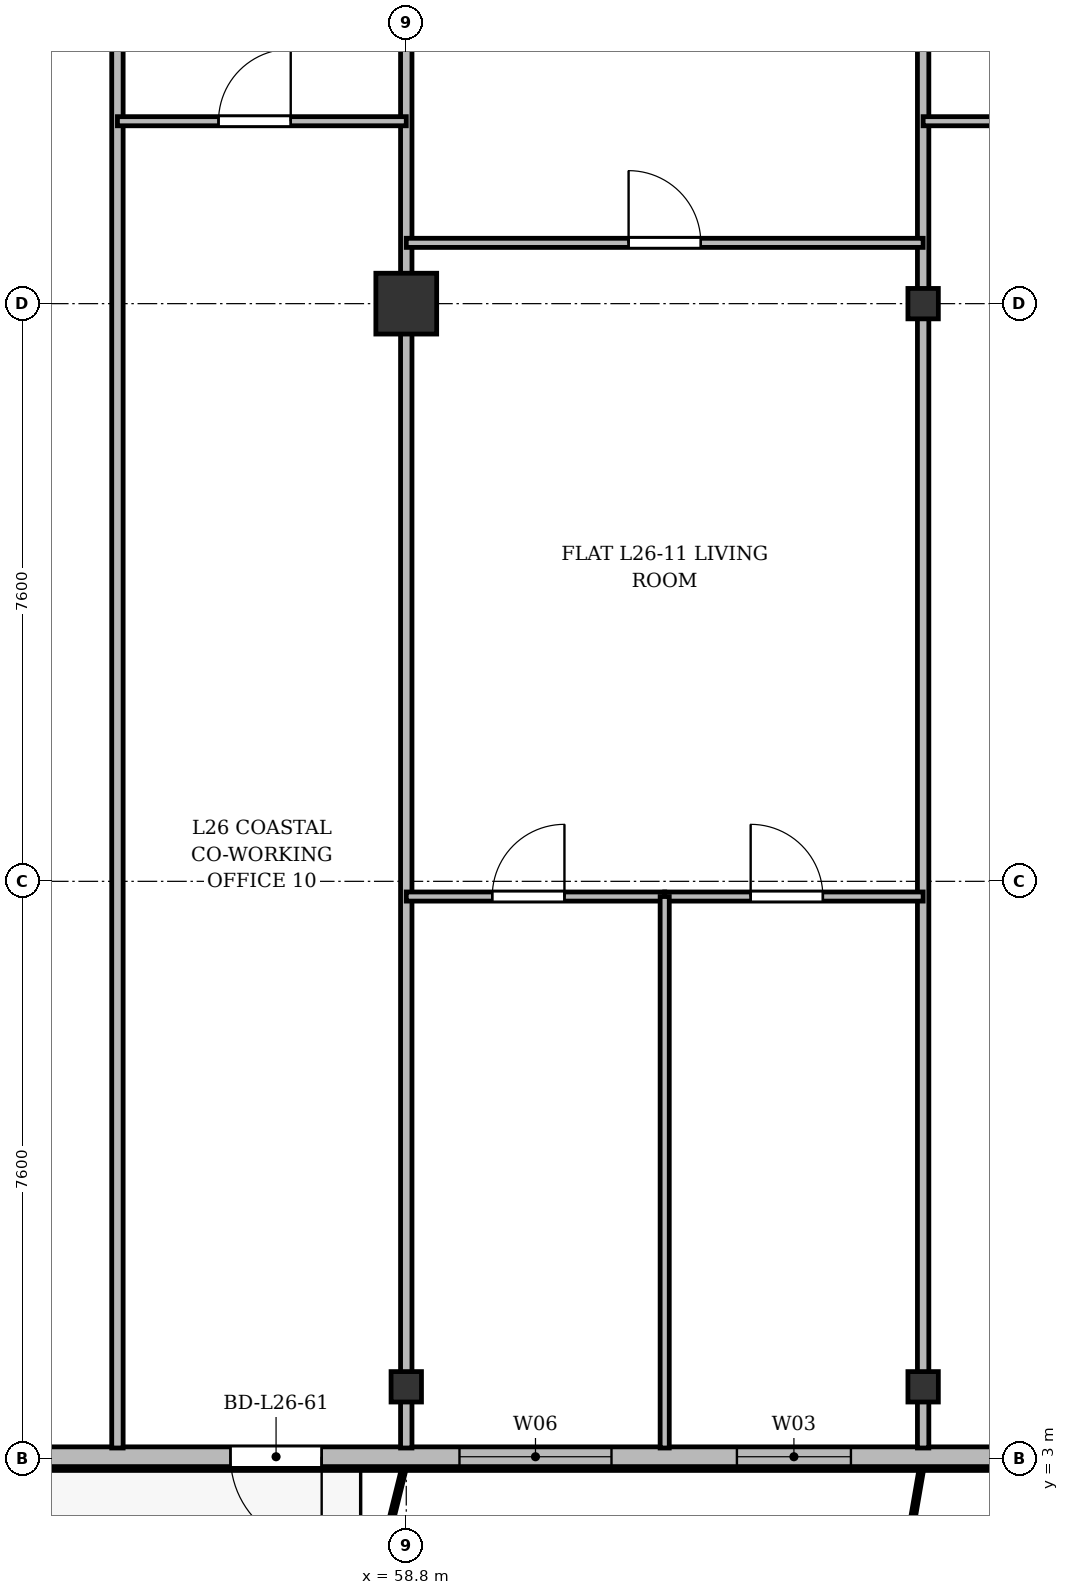
"""IFC4 building model, lengths in metres.
Left out: names, types, materials, properties, quantities, classifications, styles, units other than length and angle.
Written with IfcOpenShell. Run it as: python <this file> out.ifc"""

import sys

from ifc_helpers import new_model, si_unit, direction, frame, frame_2d, origin, origin_2d, place, context, subcontext, project, spatial, rectangle, i_section, extrude, source, transform, mapped, element, fill, save


model = new_model("IFC4")
c1 = context("Model", 3, precision=1e-05, world=origin(), true_north=direction((0.0, 1.0)))
c2 = subcontext(c1, "Body", "Model", "MODEL_VIEW")
j1 = project(units=[si_unit("LENGTHUNIT", "METRE"), si_unit("PLANEANGLEUNIT", "RADIAN")], contexts=[c1])
p1 = place(None, origin())
s1 = spatial("IfcSite", under=j1, at=p1, CompositionType="ELEMENT")
p2 = place(p1, origin())
s2 = spatial("IfcBuilding", under=s1, at=p2, CompositionType="ELEMENT")
p3 = place(p2, frame((0.0, 0.0, 103.3)))
s3 = spatial("IfcBuildingStorey", under=s2, at=p3, CompositionType="ELEMENT", Elevation=103.3)
m1 = source(origin(), c2, "Body", "SweptSolid", [
    extrude(i_section(OverallWidth=0.4, OverallDepth=0.4, WebThickness=0.022, FlangeThickness=0.035, at=origin_2d()), origin(), (0.0, 0.0, 1.0), 3.6),
])
p4 = place(p3, frame((58.8, 3.95, 0.0), z_axis=(0.0, 0.0, 1.0), x_axis=(1.0, 0.0, 0.0)))
e1 = element("IfcColumn", 1, at=p4, inside=s3, PredefinedType="COLUMN", context=c2, shape_type="MappedRepresentation", body=[
    mapped(m1, transform((0.0, 0.0, 0.0), x_axis=(1.0, 0.0, 0.0), y_axis=(0.0, 1.0, 0.0), z_axis=(0.0, 0.0, 1.0), scale=1.0)),
])
m2 = source(origin(), c2, "Body", "SweptSolid", [
    extrude(rectangle(XDim=0.8, YDim=0.8, at=origin_2d()), origin(), (0.0, 0.0, 1.0), 3.6),
])
p5 = place(p3, frame((58.8, 18.2, 0.0), z_axis=(0.0, 0.0, 1.0), x_axis=(1.0, 0.0, 0.0)))
e2 = element("IfcColumn", 2, at=p5, inside=s3, PredefinedType="COLUMN", context=c2, shape_type="MappedRepresentation", body=[
    mapped(m2, transform((0.0, 0.0, 0.0), x_axis=(1.0, 0.0, 0.0), y_axis=(0.0, 1.0, 0.0), z_axis=(0.0, 0.0, 1.0), scale=1.0)),
])
for number, where, z_axis, x_axis in (
    (3, (65.6, 3.95, 0.0), (0.0, 0.0, 1.0), (1.0, 0.0, 0.0)),
    (4, (65.6, 18.2, 0.0), (0.0, 0.0, 1.0), (1.0, 0.0, 0.0)),
):
    element("IfcColumn", number, at=place(p3, frame(where, z_axis=z_axis, x_axis=x_axis)), inside=s3, PredefinedType="COLUMN", context=c2, shape_type="MappedRepresentation", body=[
        mapped(m1, transform((0.0, 0.0, 0.0), x_axis=(1.0, 0.0, 0.0), y_axis=(0.0, 1.0, 0.0), z_axis=(0.0, 0.0, 1.0), scale=1.0)),
    ])
p6 = place(p3, frame((66.9, 3.03, 0.0), z_axis=(0.0, 0.0, 1.0), x_axis=(-1.0, 0.0, 0.0)))
e5 = element("IfcWall", 5, at=p6, inside=s3, PredefinedType="SOLIDWALL", context=c2, shape_type="SweptSolid", body=[
    extrude(rectangle(XDim=59.4, YDim=0.26, at=frame_2d((29.7, 0.0))), origin(), (0.0, 0.0, 1.0), 3.34),
])
p7 = place(p6, frame((2.25, 0.0, 0.9)))
e6 = element("IfcOpeningElement", 6, at=p7, cuts=e5, PredefinedType="OPENING", context=c2, shape_type="SweptSolid", body=[
    extrude(rectangle(XDim=1.5, YDim=1.75, at=frame_2d((0.75, 0.875))), frame((0.0, 0.14, 0.0), z_axis=(0.0, -1.0, 0.0), x_axis=(1.0, 0.0, 0.0)), (0.0, 0.0, 1.0), 0.28),
])
p8 = place(p6, frame((5.4, 0.0, 0.9)))
e7 = element("IfcOpeningElement", 7, at=p8, cuts=e5, PredefinedType="OPENING", context=c2, shape_type="SweptSolid", body=[
    extrude(rectangle(XDim=2.0, YDim=1.95, at=frame_2d((1.0, 0.975))), frame((0.0, 0.14, 0.0), z_axis=(0.0, -1.0, 0.0), x_axis=(1.0, 0.0, 0.0)), (0.0, 0.0, 1.0), 0.28),
])
p9 = place(p6, frame((9.213, 0.0, 0.0)))
e8 = element("IfcOpeningElement", 8, at=p9, cuts=e5, PredefinedType="OPENING", context=c2, shape_type="SweptSolid", body=[
    extrude(rectangle(XDim=1.2, YDim=2.2, at=frame_2d((0.6, 1.1))), frame((0.0, 0.14, 0.0), z_axis=(0.0, -1.0, 0.0), x_axis=(1.0, 0.0, 0.0)), (0.0, 0.0, 1.0), 0.28),
])
p10 = place(p6, frame((13.0, 0.0, 0.9)))
e9 = element("IfcOpeningElement", 9, at=p10, cuts=e5, PredefinedType="OPENING", context=c2, shape_type="SweptSolid", body=[
    extrude(rectangle(XDim=1.8, YDim=1.8, at=frame_2d((0.9, 0.9))), frame((0.0, 0.14, 0.0), z_axis=(0.0, -1.0, 0.0), x_axis=(1.0, 0.0, 0.0)), (0.0, 0.0, 1.0), 0.28),
])
p11 = place(p6, frame((16.6, 0.0, 0.9)))
e10 = element("IfcOpeningElement", 10, at=p11, cuts=e5, PredefinedType="OPENING", context=c2, shape_type="SweptSolid", body=[
    extrude(rectangle(XDim=2.2, YDim=1.8, at=frame_2d((1.1, 0.9))), frame((0.0, 0.14, 0.0), z_axis=(0.0, -1.0, 0.0), x_axis=(1.0, 0.0, 0.0)), (0.0, 0.0, 1.0), 0.28),
])
p12 = place(p6, frame((20.55, 0.0, 0.9)))
e11 = element("IfcOpeningElement", 11, at=p12, cuts=e5, PredefinedType="OPENING", context=c2, shape_type="SweptSolid", body=[
    extrude(rectangle(XDim=1.5, YDim=1.75, at=frame_2d((0.75, 0.875))), frame((0.0, 0.14, 0.0), z_axis=(0.0, -1.0, 0.0), x_axis=(1.0, 0.0, 0.0)), (0.0, 0.0, 1.0), 0.28),
])
p13 = place(p6, frame((25.4, 0.0, 0.9)))
e12 = element("IfcOpeningElement", 12, at=p13, cuts=e5, PredefinedType="OPENING", context=c2, shape_type="SweptSolid", body=[
    extrude(rectangle(XDim=2.0, YDim=1.95, at=frame_2d((1.0, 0.975))), frame((0.0, 0.14, 0.0), z_axis=(0.0, -1.0, 0.0), x_axis=(1.0, 0.0, 0.0)), (0.0, 0.0, 1.0), 0.28),
])
p14 = place(p6, frame((32.175, 0.0, 0.9)))
e13 = element("IfcOpeningElement", 13, at=p14, cuts=e5, PredefinedType="OPENING", context=c2, shape_type="SweptSolid", body=[
    extrude(rectangle(XDim=1.65, YDim=1.85, at=frame_2d((0.825, 0.925))), frame((0.0, 0.14, 0.0), z_axis=(0.0, -1.0, 0.0), x_axis=(1.0, 0.0, 0.0)), (0.0, 0.0, 1.0), 0.28),
])
p15 = place(p6, frame((37.584, 0.0, 0.0)))
e14 = element("IfcOpeningElement", 14, at=p15, cuts=e5, PredefinedType="OPENING", context=c2, shape_type="SweptSolid", body=[
    extrude(rectangle(XDim=1.2, YDim=2.2, at=frame_2d((0.6, 1.1))), frame((0.0, 0.14, 0.0), z_axis=(0.0, -1.0, 0.0), x_axis=(1.0, 0.0, 0.0)), (0.0, 0.0, 1.0), 0.28),
])
p16 = place(p6, frame((40.5, 0.0, 0.9)))
e15 = element("IfcOpeningElement", 15, at=p16, cuts=e5, PredefinedType="OPENING", context=c2, shape_type="SweptSolid", body=[
    extrude(rectangle(XDim=2.2, YDim=1.8, at=frame_2d((1.1, 0.9))), frame((0.0, 0.14, 0.0), z_axis=(0.0, -1.0, 0.0), x_axis=(1.0, 0.0, 0.0)), (0.0, 0.0, 1.0), 0.28),
])
p17 = place(p6, frame((46.65, 0.0, 0.9)))
e16 = element("IfcOpeningElement", 16, at=p17, cuts=e5, PredefinedType="OPENING", context=c2, shape_type="SweptSolid", body=[
    extrude(rectangle(XDim=1.5, YDim=1.75, at=frame_2d((0.75, 0.875))), frame((0.0, 0.14, 0.0), z_axis=(0.0, -1.0, 0.0), x_axis=(1.0, 0.0, 0.0)), (0.0, 0.0, 1.0), 0.28),
])
p18 = place(p6, frame((55.817, 0.0, 0.0)))
e17 = element("IfcOpeningElement", 17, at=p18, cuts=e5, PredefinedType="OPENING", context=c2, shape_type="SweptSolid", body=[
    extrude(rectangle(XDim=1.2, YDim=2.2, at=frame_2d((0.6, 1.1))), frame((0.0, 0.14, 0.0), z_axis=(0.0, -1.0, 0.0), x_axis=(1.0, 0.0, 0.0)), (0.0, 0.0, 1.0), 0.28),
])
p19 = place(p3, frame((55.0, 3.145, 0.0), z_axis=(0.0, 0.0, 1.0), x_axis=(0.0, 1.0, 0.0)))
e18 = element("IfcWall", 18, at=p19, inside=s3, PredefinedType="PARTITIONING", context=c2, shape_type="SweptSolid", body=[
    extrude(rectangle(XDim=24.455, YDim=0.15, at=frame_2d((12.228, 0.0))), origin(), (0.0, 0.0, 1.0), 2.752),
])
for number, where, z_axis, x_axis in (
    (19, (58.8, 3.145, 0.0), (0.0, 0.0, 1.0), (0.0, 1.0, 0.0)),
    (20, (65.6, 3.145, 0.0), (0.0, 0.0, 1.0), (0.0, 1.0, 0.0)),
):
    element("IfcWall", number, at=place(p3, frame(where, z_axis=z_axis, x_axis=x_axis)), inside=s3, PredefinedType="PARTITIONING", context=c2, shape_type="SweptSolid", body=[
        extrude(rectangle(XDim=24.455, YDim=0.15, at=frame_2d((12.228, 0.0))), origin(), (0.0, 0.0, 1.0), 2.84),
    ])
p20 = place(p3, frame((55.0, 20.6, 0.0), z_axis=(0.0, 0.0, 1.0), x_axis=(1.0, 0.0, 0.0)))
e21 = element("IfcWall", 21, at=p20, inside=s3, PredefinedType="PARTITIONING", context=c2, shape_type="SweptSolid", body=[
    extrude(rectangle(XDim=3.8, YDim=0.12, at=frame_2d((1.9, 0.0))), origin(), (0.0, 0.0, 1.0), 2.84),
])
p21 = place(p20, frame((1.33, 0.0, 0.0)))
e22 = element("IfcOpeningElement", 22, at=p21, cuts=e21, PredefinedType="OPENING", context=c2, shape_type="SweptSolid", body=[
    extrude(rectangle(XDim=0.95, YDim=2.15, at=frame_2d((0.475, 1.075))), frame((0.0, 0.07, 0.0), z_axis=(0.0, -1.0, 0.0), x_axis=(1.0, 0.0, 0.0)), (0.0, 0.0, 1.0), 0.14),
])
p22 = place(p3, frame((58.8, 19.0, 0.0), z_axis=(0.0, 0.0, 1.0), x_axis=(1.0, 0.0, 0.0)))
e23 = element("IfcWall", 23, at=p22, inside=s3, PredefinedType="PARTITIONING", context=c2, shape_type="SweptSolid", body=[
    extrude(rectangle(XDim=6.8, YDim=0.12, at=frame_2d((3.4, 0.0))), origin(), (0.0, 0.0, 1.0), 2.84),
])
p23 = place(p22, frame((2.925, 0.0, 0.0)))
e24 = element("IfcOpeningElement", 24, at=p23, cuts=e23, PredefinedType="OPENING", context=c2, shape_type="SweptSolid", body=[
    extrude(rectangle(XDim=0.95, YDim=2.15, at=frame_2d((0.475, 1.075))), frame((0.0, 0.07, 0.0), z_axis=(0.0, -1.0, 0.0), x_axis=(1.0, 0.0, 0.0)), (0.0, 0.0, 1.0), 0.14),
])
p24 = place(p3, frame((58.8, 10.4, 0.0), z_axis=(0.0, 0.0, 1.0), x_axis=(1.0, 0.0, 0.0)))
e25 = element("IfcWall", 25, at=p24, inside=s3, PredefinedType="PARTITIONING", context=c2, shape_type="SweptSolid", body=[
    extrude(rectangle(XDim=3.4, YDim=0.12, at=frame_2d((1.7, 0.0))), origin(), (0.0, 0.0, 1.0), 2.84),
])
p25 = place(p24, frame((1.131, 0.0, 0.0)))
e26 = element("IfcOpeningElement", 26, at=p25, cuts=e25, PredefinedType="OPENING", context=c2, shape_type="SweptSolid", body=[
    extrude(rectangle(XDim=0.95, YDim=2.15, at=frame_2d((0.475, 1.075))), frame((0.0, 0.07, 0.0), z_axis=(0.0, -1.0, 0.0), x_axis=(1.0, 0.0, 0.0)), (0.0, 0.0, 1.0), 0.14),
])
p26 = place(p3, frame((62.2, 10.4, 0.0), z_axis=(0.0, 0.0, 1.0), x_axis=(1.0, 0.0, 0.0)))
e27 = element("IfcWall", 27, at=p26, inside=s3, PredefinedType="PARTITIONING", context=c2, shape_type="SweptSolid", body=[
    extrude(rectangle(XDim=3.4, YDim=0.12, at=frame_2d((1.7, 0.0))), origin(), (0.0, 0.0, 1.0), 2.84),
])
p27 = place(p26, frame((1.131, 0.0, 0.0)))
e28 = element("IfcOpeningElement", 28, at=p27, cuts=e27, PredefinedType="OPENING", context=c2, shape_type="SweptSolid", body=[
    extrude(rectangle(XDim=0.95, YDim=2.15, at=frame_2d((0.475, 1.075))), frame((0.0, 0.07, 0.0), z_axis=(0.0, -1.0, 0.0), x_axis=(1.0, 0.0, 0.0)), (0.0, 0.0, 1.0), 0.14),
])
p28 = place(p3, frame((62.2, 3.145, 0.0), z_axis=(0.0, 0.0, 1.0), x_axis=(0.0, 1.0, 0.0)))
e29 = element("IfcWall", 29, at=p28, inside=s3, PredefinedType="PARTITIONING", context=c2, shape_type="SweptSolid", body=[
    extrude(rectangle(XDim=7.255, YDim=0.12, at=frame_2d((3.627, 0.0))), origin(), (0.0, 0.0, 1.0), 2.752),
])
p29 = place(p3, frame((65.6, 20.6, 0.0), z_axis=(0.0, 0.0, 1.0), x_axis=(1.0, 0.0, 0.0)))
e30 = element("IfcWall", 30, at=p29, inside=s3, PredefinedType="PARTITIONING", context=c2, shape_type="SweptSolid", body=[
    extrude(rectangle(XDim=4.055, YDim=0.12, at=frame_2d((2.027, 0.0))), origin(), (0.0, 0.0, 1.0), 2.84),
])
p30 = place(p29, frame((1.462, 0.0, 0.0)))
e31 = element("IfcOpeningElement", 31, at=p30, cuts=e30, PredefinedType="OPENING", context=c2, shape_type="SweptSolid", body=[
    extrude(rectangle(XDim=0.95, YDim=2.15, at=frame_2d((0.475, 1.075))), frame((0.0, 0.07, 0.0), z_axis=(0.0, -1.0, 0.0), x_axis=(1.0, 0.0, 0.0)), (0.0, 0.0, 1.0), 0.14),
])
m3 = source(origin(), c2, "Body", "SweptSolid", [
    extrude(rectangle(XDim=1.5, YDim=1.75, at=frame_2d((0.75, 0.875))), frame((0.0, 0.03, 0.0), z_axis=(0.0, -1.0, 0.0), x_axis=(1.0, 0.0, 0.0)), (0.0, 0.0, 1.0), 0.06),
])
p31 = place(p7, origin())
e32 = element("IfcWindow", 32, at=p31, inside=s3, PartitioningType="SINGLE_PANEL", PredefinedType="WINDOW", context=c2, shape_type="MappedRepresentation", body=[
    mapped(m3, transform((0.0, 0.0, 0.0), x_axis=(1.0, 0.0, 0.0), y_axis=(0.0, 1.0, 0.0), z_axis=(0.0, 0.0, 1.0), scale=1.0)),
])
fill(e6, e32)
m4 = source(origin(), c2, "Body", "SweptSolid", [
    extrude(rectangle(XDim=2.0, YDim=1.95, at=frame_2d((1.0, 0.975))), frame((0.0, 0.03, 0.0), z_axis=(0.0, -1.0, 0.0), x_axis=(1.0, 0.0, 0.0)), (0.0, 0.0, 1.0), 0.06),
])
p32 = place(p8, origin())
e33 = element("IfcWindow", 33, at=p32, inside=s3, PartitioningType="SINGLE_PANEL", PredefinedType="WINDOW", context=c2, shape_type="MappedRepresentation", body=[
    mapped(m4, transform((0.0, 0.0, 0.0), x_axis=(1.0, 0.0, 0.0), y_axis=(0.0, 1.0, 0.0), z_axis=(0.0, 0.0, 1.0), scale=1.0)),
])
fill(e7, e33)
m5 = source(origin(), c2, "Body", "SweptSolid", [
    extrude(rectangle(XDim=1.2, YDim=2.2, at=frame_2d((0.6, 1.1))), frame((0.0, 0.025, 0.0), z_axis=(0.0, -1.0, 0.0), x_axis=(1.0, 0.0, 0.0)), (0.0, 0.0, 1.0), 0.05),
])
p33 = place(p9, origin())
e34 = element("IfcDoor", 34, at=p33, inside=s3, OperationType="SINGLE_SWING_LEFT", PredefinedType="DOOR", context=c2, shape_type="MappedRepresentation", body=[
    mapped(m5, transform((0.0, 0.0, 0.0), x_axis=(1.0, 0.0, 0.0), y_axis=(0.0, 1.0, 0.0), z_axis=(0.0, 0.0, 1.0), scale=1.0)),
])
fill(e8, e34)
m6 = source(origin(), c2, "Body", "SweptSolid", [
    extrude(rectangle(XDim=0.95, YDim=2.15, at=frame_2d((0.475, 1.075))), frame((0.0, 0.025, 0.0), z_axis=(0.0, -1.0, 0.0), x_axis=(1.0, 0.0, 0.0)), (0.0, 0.0, 1.0), 0.05),
])
p34 = place(p21, origin())
e35 = element("IfcDoor", 35, at=p34, inside=s3, OperationType="SINGLE_SWING_RIGHT", PredefinedType="DOOR", context=c2, shape_type="MappedRepresentation", body=[
    mapped(m6, transform((0.0, 0.0, 0.0), x_axis=(1.0, 0.0, 0.0), y_axis=(0.0, 1.0, 0.0), z_axis=(0.0, 0.0, 1.0), scale=1.0)),
])
fill(e22, e35)
p35 = place(p23, origin())
e36 = element("IfcDoor", 36, at=p35, inside=s3, OperationType="SINGLE_SWING_LEFT", PredefinedType="DOOR", context=c2, shape_type="MappedRepresentation", body=[
    mapped(m6, transform((0.0, 0.0, 0.0), x_axis=(1.0, 0.0, 0.0), y_axis=(0.0, 1.0, 0.0), z_axis=(0.0, 0.0, 1.0), scale=1.0)),
])
fill(e24, e36)
p36 = place(p25, origin())
e37 = element("IfcDoor", 37, at=p36, inside=s3, OperationType="SINGLE_SWING_RIGHT", PredefinedType="DOOR", context=c2, shape_type="MappedRepresentation", body=[
    mapped(m6, transform((0.0, 0.0, 0.0), x_axis=(1.0, 0.0, 0.0), y_axis=(0.0, 1.0, 0.0), z_axis=(0.0, 0.0, 1.0), scale=1.0)),
])
fill(e26, e37)
p37 = place(p27, origin())
e38 = element("IfcDoor", 38, at=p37, inside=s3, OperationType="SINGLE_SWING_LEFT", PredefinedType="DOOR", context=c2, shape_type="MappedRepresentation", body=[
    mapped(m6, transform((0.0, 0.0, 0.0), x_axis=(1.0, 0.0, 0.0), y_axis=(0.0, 1.0, 0.0), z_axis=(0.0, 0.0, 1.0), scale=1.0)),
])
fill(e28, e38)
save(model, sys.argv[1])
